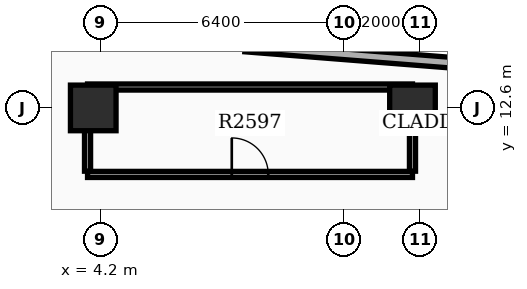
"""IFC4 building model, lengths in metres.
Left out: names, types, materials, properties, quantities, classifications, styles, units other than length and angle.
Written with IfcOpenShell. Run it as: python <this file> out.ifc"""

import sys

from ifc_helpers import new_model, si_unit, direction, frame, frame_2d, origin, origin_2d, place, context, subcontext, project, spatial, rectangle, extrude, element, fill, save


model = new_model("IFC4")
c1 = context("Model", 3, precision=1e-05, world=origin(), true_north=direction((0.0, 1.0)))
c2 = subcontext(c1, "Body", "Model", "MODEL_VIEW")
j1 = project(units=[si_unit("LENGTHUNIT", "METRE"), si_unit("PLANEANGLEUNIT", "RADIAN")], contexts=[c1])
p1 = place(None, origin())
s1 = spatial("IfcSite", under=j1, at=p1, CompositionType="ELEMENT")
p2 = place(p1, origin())
s2 = spatial("IfcBuilding", under=s1, at=p2, CompositionType="ELEMENT")
p3 = place(p2, frame((0.0, 0.0, 164.4)))
s3 = spatial("IfcBuildingStorey", under=s2, at=p3, CompositionType="ELEMENT", Elevation=164.4)
for number, where, z_axis, x_axis in (
    (1, (12.4, 12.6, 0.0), (0.0, 0.0, 1.0), (1.0, 0.0, 0.0)),
    (2, (4.0, 12.6, 0.0), (0.0, 0.0, 1.0), (1.0, 0.0, 0.0)),
):
    element("IfcColumn", number, at=place(p3, frame(where, z_axis=z_axis, x_axis=x_axis)), inside=s3, PredefinedType="COLUMN", context=c2, shape_type="SweptSolid", body=[
        extrude(rectangle(XDim=1.2, YDim=1.2, at=origin_2d()), origin(), (0.0, 0.0, 1.0), 3.9),
    ])
p4 = place(p3, frame((14.281, 13.722, 0.0), z_axis=(0.0, 0.0, 1.0), x_axis=(-0.99691915642, 0.078435932851, 0.0)))
e3 = element("IfcWall", 3, at=p4, inside=s3, PredefinedType="STANDARD", context=c2, shape_type="SweptSolid", body=[
    extrude(rectangle(XDim=6.3, YDim=0.28, at=frame_2d((3.15, 0.0))), origin(), (0.0, 0.0, 1.0), 2.97),
])
p5 = place(p3, frame((3.85, 10.85, 0.0), z_axis=(0.0, 0.0, 1.0), x_axis=(1.0, 0.0, 0.0)))
e4 = element("IfcWall", 4, at=p5, inside=s3, PredefinedType="PARTITIONING", context=c2, shape_type="SweptSolid", body=[
    extrude(rectangle(XDim=8.55, YDim=0.16, at=frame_2d((4.275, 0.0))), origin(), (0.0, 0.0, 1.0), 2.96),
])
p6 = place(p5, frame((3.795, 0.0, 0.0)))
e5 = element("IfcOpeningElement", 5, at=p6, cuts=e4, PredefinedType="OPENING", context=c2, shape_type="SweptSolid", body=[
    extrude(rectangle(XDim=0.96, YDim=2.15, at=frame_2d((0.48, 1.075))), frame((0.0, 0.09, 0.0), z_axis=(0.0, -1.0, 0.0), x_axis=(1.0, 0.0, 0.0)), (0.0, 0.0, 1.0), 0.18),
])
p7 = place(p3, frame((3.85, 13.15, 0.0), z_axis=(0.0, 0.0, 1.0), x_axis=(1.0, 0.0, 0.0)))
e6 = element("IfcWall", 6, at=p7, inside=s3, PredefinedType="PARTITIONING", context=c2, shape_type="SweptSolid", body=[
    extrude(rectangle(XDim=8.55, YDim=0.16, at=frame_2d((4.275, 0.0))), origin(), (0.0, 0.0, 1.0), 2.96),
])
for number, where, z_axis, x_axis in (
    (7, (3.85, 10.935, 0.0), (0.0, 0.0, 1.0), (0.0, 1.0, 0.0)),
    (8, (12.4, 10.935, 0.0), (0.0, 0.0, 1.0), (0.0, 1.0, 0.0)),
):
    element("IfcWall", number, at=place(p3, frame(where, z_axis=z_axis, x_axis=x_axis)), inside=s3, PredefinedType="PARTITIONING", context=c2, shape_type="SweptSolid", body=[
        extrude(rectangle(XDim=2.13, YDim=0.16, at=frame_2d((1.065, 0.0))), origin(), (0.0, 0.0, 1.0), 2.96),
    ])
p8 = place(p6, origin())
e9 = element("IfcDoor", 9, at=p8, inside=s3, OperationType="SINGLE_SWING_LEFT", PredefinedType="DOOR", context=c2, shape_type="SweptSolid", body=[
    extrude(rectangle(XDim=0.96, YDim=2.15, at=frame_2d((0.48, 1.075))), frame((0.0, 0.025, 0.0), z_axis=(0.0, -1.0, 0.0), x_axis=(1.0, 0.0, 0.0)), (0.0, 0.0, 1.0), 0.05),
])
fill(e5, e9)
save(model, sys.argv[1])
